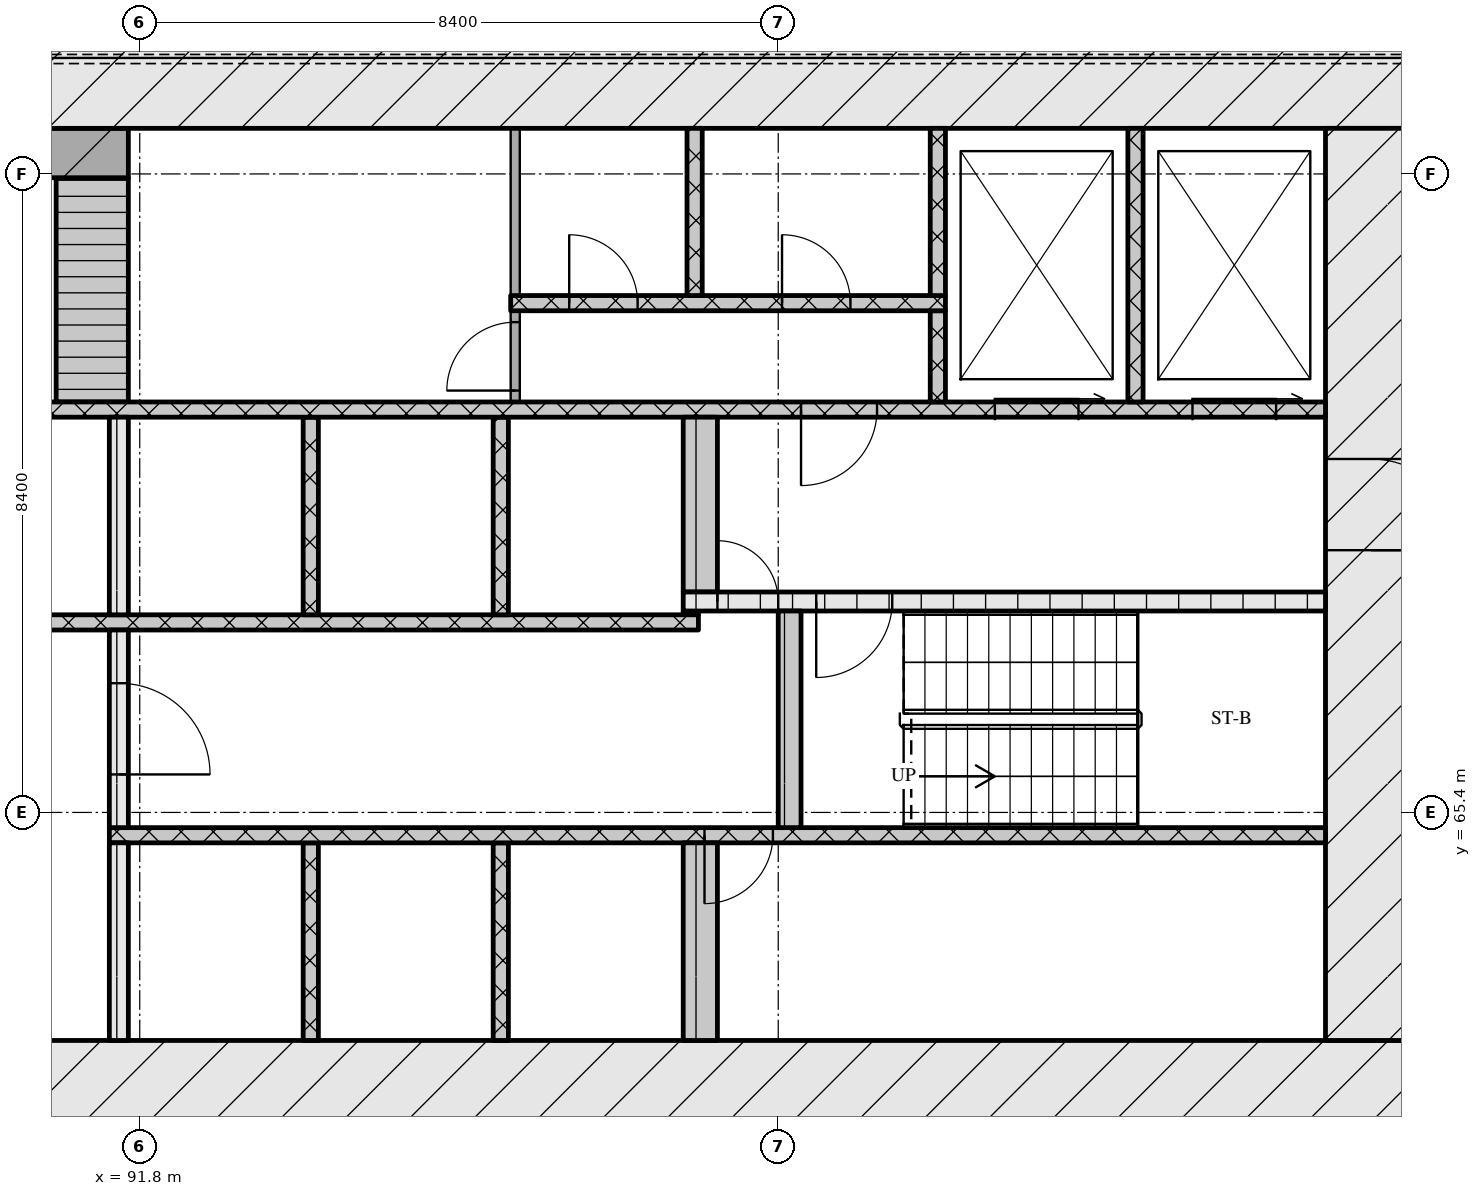
"""IFC4 building model, lengths in metres.
Left out: names, types, materials, properties, quantities, classifications, styles, units other than length and angle.
Written with IfcOpenShell. Run it as: python <this file> out.ifc"""

import sys

from ifc_helpers import new_model, si_unit, direction, frame, frame_2d, origin, place, context, subcontext, project, spatial, rectangle, extrude, element, fill, save


model = new_model("IFC4")
c1 = context("Model", 3, precision=1e-05, world=origin(), true_north=direction((0.0, 1.0)))
c2 = subcontext(c1, "Body", "Model", "MODEL_VIEW")
j1 = project(units=[si_unit("LENGTHUNIT", "METRE"), si_unit("PLANEANGLEUNIT", "RADIAN")], contexts=[c1])
p1 = place(None, origin())
s1 = spatial("IfcSite", under=j1, at=p1, CompositionType="ELEMENT")
p2 = place(p1, origin())
s2 = spatial("IfcBuilding", under=s1, at=p2, CompositionType="ELEMENT")
p3 = place(p2, frame((0.0, 0.0, 23.7)))
s3 = spatial("IfcBuildingStorey", under=s2, at=p3, CompositionType="ELEMENT", Elevation=23.7)
p4 = place(p3, frame((66.6, 61.8, 0.0), z_axis=(0.0, 0.0, 1.0), x_axis=(1.0, 0.0, 0.0)))
e1 = element("IfcWall", 1, at=p4, inside=s3, PredefinedType="SOLIDWALL", context=c2, shape_type="SweptSolid", body=[
    extrude(rectangle(XDim=42.0, YDim=1.2, at=frame_2d((21.0, 0.0))), origin(), (0.0, 0.0, 1.0), 4.2),
])
p5 = place(p4, frame((21.35, 0.0, 0.0)))
e2 = element("IfcOpeningElement", 2, at=p5, cuts=e1, PredefinedType="OPENING", context=c2, shape_type="SweptSolid", body=[
    extrude(rectangle(XDim=1.8, YDim=2.1, at=frame_2d((0.9, 1.05))), frame((0.0, 0.61, 0.0), z_axis=(0.0, -1.0, 0.0), x_axis=(1.0, 0.0, 0.0)), (0.0, 0.0, 1.0), 1.22),
])
p6 = place(p3, frame((66.6, 75.0, 0.0), z_axis=(0.0, 0.0, 1.0), x_axis=(1.0, 0.0, 0.0)))
e3 = element("IfcWall", 3, at=p6, inside=s3, PredefinedType="SOLIDWALL", context=c2, shape_type="SweptSolid", body=[
    extrude(rectangle(XDim=42.0, YDim=1.2, at=frame_2d((21.0, 0.0))), origin(), (0.0, 0.0, 1.0), 4.2),
])
p7 = place(p3, frame((108.0, 62.4, 0.0), z_axis=(0.0, 0.0, 1.0), x_axis=(0.0, 1.0, 0.0)))
e4 = element("IfcWall", 4, at=p7, inside=s3, PredefinedType="SOLIDWALL", context=c2, shape_type="SweptSolid", body=[
    extrude(rectangle(XDim=12.0, YDim=1.2, at=frame_2d((6.0, 0.0))), origin(), (0.0, 0.0, 1.0), 4.2),
])
p8 = place(p7, frame((6.45, 0.0, 0.0)))
e5 = element("IfcOpeningElement", 5, at=p8, cuts=e4, PredefinedType="OPENING", context=c2, shape_type="SweptSolid", body=[
    extrude(rectangle(XDim=1.2, YDim=2.1, at=frame_2d((0.6, 1.05))), frame((0.0, 0.61, 0.0), z_axis=(0.0, -1.0, 0.0), x_axis=(1.0, 0.0, 0.0)), (0.0, 0.0, 1.0), 1.22),
])
p9 = place(p3, frame((91.525, 62.4, 0.0), z_axis=(0.0, 0.0, 1.0), x_axis=(0.0, 1.0, 0.0)))
e6 = element("IfcWall", 6, at=p9, inside=s3, PredefinedType="SOLIDWALL", context=c2, shape_type="SweptSolid", body=[
    extrude(rectangle(XDim=2.6, YDim=0.25, at=frame_2d((1.3, 0.0))), origin(), (0.0, 0.0, 1.0), 4.2),
])
for number, where, z_axis, x_axis in (
    (7, (94.05, 62.4, 0.0), (0.0, 0.0, 1.0), (0.0, 1.0, 0.0)),
    (8, (96.55, 62.4, 0.0), (0.0, 0.0, 1.0), (0.0, 1.0, 0.0)),
):
    element("IfcWall", number, at=place(p3, frame(where, z_axis=z_axis, x_axis=x_axis)), inside=s3, PredefinedType="SOLIDWALL", context=c2, shape_type="SweptSolid", body=[
        extrude(rectangle(XDim=2.6, YDim=0.2, at=frame_2d((1.3, 0.0))), origin(), (0.0, 0.0, 1.0), 4.2),
    ])
p10 = place(p3, frame((99.175, 62.4, 0.0), z_axis=(0.0, 0.0, 1.0), x_axis=(0.0, 1.0, 0.0)))
e9 = element("IfcWall", 9, at=p10, inside=s3, PredefinedType="SOLIDWALL", context=c2, shape_type="SweptSolid", body=[
    extrude(rectangle(XDim=2.6, YDim=0.45, at=frame_2d((1.3, 0.0))), origin(), (0.0, 0.0, 1.0), 4.2),
])
p11 = place(p3, frame((91.4, 65.1, 0.0), z_axis=(0.0, 0.0, 1.0), x_axis=(1.0, 0.0, 0.0)))
e10 = element("IfcWall", 10, at=p11, inside=s3, PredefinedType="SOLIDWALL", context=c2, shape_type="SweptSolid", body=[
    extrude(rectangle(XDim=16.0, YDim=0.2, at=frame_2d((8.0, 0.0))), origin(), (0.0, 0.0, 1.0), 4.2),
])
p12 = place(p11, frame((7.83, 0.0, 0.0)))
e11 = element("IfcOpeningElement", 11, at=p12, cuts=e10, PredefinedType="OPENING", context=c2, shape_type="SweptSolid", body=[
    extrude(rectangle(XDim=0.9, YDim=2.1, at=frame_2d((0.45, 1.05))), frame((0.0, 0.11, 0.0), z_axis=(0.0, -1.0, 0.0), x_axis=(1.0, 0.0, 0.0)), (0.0, 0.0, 1.0), 0.22),
])
p13 = place(p3, frame((91.525, 65.2, 0.0), z_axis=(0.0, 0.0, 1.0), x_axis=(0.0, 1.0, 0.0)))
e12 = element("IfcWall", 12, at=p13, inside=s3, PredefinedType="SOLIDWALL", context=c2, shape_type="SweptSolid", body=[
    extrude(rectangle(XDim=2.6, YDim=0.25, at=frame_2d((1.3, 0.0))), origin(), (0.0, 0.0, 1.0), 4.2),
])
p14 = place(p13, frame((0.7, 0.0, 0.0)))
e13 = element("IfcOpeningElement", 13, at=p14, cuts=e12, PredefinedType="OPENING", context=c2, shape_type="SweptSolid", body=[
    extrude(rectangle(XDim=1.2, YDim=2.1, at=frame_2d((0.6, 1.05))), frame((0.0, 0.135, 0.0), z_axis=(0.0, -1.0, 0.0), x_axis=(1.0, 0.0, 0.0)), (0.0, 0.0, 1.0), 0.27),
])
p15 = place(p3, frame((100.35, 65.2, 0.0), z_axis=(0.0, 0.0, 1.0), x_axis=(0.0, 1.0, 0.0)))
e14 = element("IfcWall", 14, at=p15, inside=s3, PredefinedType="SOLIDWALL", context=c2, shape_type="SweptSolid", body=[
    extrude(rectangle(XDim=2.85, YDim=0.3, at=frame_2d((1.425, 0.0))), origin(), (0.0, 0.0, 1.0), 4.2),
])
p16 = place(p3, frame((76.05, 67.9, 0.0), z_axis=(0.0, 0.0, 1.0), x_axis=(1.0, 0.0, 0.0)))
e15 = element("IfcWall", 15, at=p16, inside=s3, PredefinedType="SOLIDWALL", context=c2, shape_type="SweptSolid", body=[
    extrude(rectangle(XDim=23.1, YDim=0.2, at=frame_2d((11.55, 0.0))), origin(), (0.0, 0.0, 1.0), 4.2),
])
p17 = place(p16, frame((8.35, 0.0, 0.0)))
e16 = element("IfcOpeningElement", 16, at=p17, cuts=e15, PredefinedType="OPENING", context=c2, shape_type="SweptSolid", body=[
    extrude(rectangle(XDim=1.1, YDim=2.1, at=frame_2d((0.55, 1.05))), frame((0.0, 0.11, 0.0), z_axis=(0.0, -1.0, 0.0), x_axis=(1.0, 0.0, 0.0)), (0.0, 0.0, 1.0), 0.22),
])
p18 = place(p16, frame((10.85, 0.0, 0.0)))
e17 = element("IfcOpeningElement", 17, at=p18, cuts=e15, PredefinedType="OPENING", context=c2, shape_type="SweptSolid", body=[
    extrude(rectangle(XDim=1.1, YDim=2.1, at=frame_2d((0.55, 1.05))), frame((0.0, 0.11, 0.0), z_axis=(0.0, -1.0, 0.0), x_axis=(1.0, 0.0, 0.0)), (0.0, 0.0, 1.0), 0.22),
])
p19 = place(p16, frame((13.55, 0.0, 0.0)))
e18 = element("IfcOpeningElement", 18, at=p19, cuts=e15, PredefinedType="OPENING", context=c2, shape_type="SweptSolid", body=[
    extrude(rectangle(XDim=1.0, YDim=2.1, at=frame_2d((0.5, 1.05))), frame((0.0, 0.11, 0.0), z_axis=(0.0, -1.0, 0.0), x_axis=(1.0, 0.0, 0.0)), (0.0, 0.0, 1.0), 0.22),
])
p20 = place(p3, frame((91.525, 68.0, 0.0), z_axis=(0.0, 0.0, 1.0), x_axis=(0.0, 1.0, 0.0)))
e19 = element("IfcWall", 19, at=p20, inside=s3, PredefinedType="SOLIDWALL", context=c2, shape_type="SweptSolid", body=[
    extrude(rectangle(XDim=2.6, YDim=0.25, at=frame_2d((1.3, 0.0))), origin(), (0.0, 0.0, 1.0), 4.2),
])
for number, where, z_axis, x_axis in (
    (20, (94.05, 68.0, 0.0), (0.0, 0.0, 1.0), (0.0, 1.0, 0.0)),
    (21, (96.55, 68.0, 0.0), (0.0, 0.0, 1.0), (0.0, 1.0, 0.0)),
):
    element("IfcWall", number, at=place(p3, frame(where, z_axis=z_axis, x_axis=x_axis)), inside=s3, PredefinedType="SOLIDWALL", context=c2, shape_type="SweptSolid", body=[
        extrude(rectangle(XDim=2.6, YDim=0.2, at=frame_2d((1.3, 0.0))), origin(), (0.0, 0.0, 1.0), 4.2),
    ])
p21 = place(p3, frame((98.95, 68.025, 0.0), z_axis=(0.0, 0.0, 1.0), x_axis=(1.0, 0.0, 0.0)))
e22 = element("IfcWall", 22, at=p21, inside=s3, PredefinedType="SOLIDWALL", context=c2, shape_type="SweptSolid", body=[
    extrude(rectangle(XDim=0.2, YDim=0.05, at=frame_2d((0.1, 0.0))), origin(), (0.0, 0.0, 1.0), 4.2),
])
p22 = place(p3, frame((98.95, 68.175, 0.0), z_axis=(0.0, 0.0, 1.0), x_axis=(1.0, 0.0, 0.0)))
e23 = element("IfcWall", 23, at=p22, inside=s3, PredefinedType="SOLIDWALL", context=c2, shape_type="SweptSolid", body=[
    extrude(rectangle(XDim=8.45, YDim=0.25, at=frame_2d((4.225, 0.0))), origin(), (0.0, 0.0, 1.0), 4.2),
])
p23 = place(p22, frame((0.45, 0.0, 0.0)))
e24 = element("IfcOpeningElement", 24, at=p23, cuts=e23, PredefinedType="OPENING", context=c2, shape_type="SweptSolid", body=[
    extrude(rectangle(XDim=0.8, YDim=2.1, at=frame_2d((0.4, 1.05))), frame((0.0, 0.135, 0.0), z_axis=(0.0, -1.0, 0.0), x_axis=(1.0, 0.0, 0.0)), (0.0, 0.0, 1.0), 0.27),
])
p24 = place(p22, frame((1.75, 0.0, 0.0)))
e25 = element("IfcOpeningElement", 25, at=p24, cuts=e23, PredefinedType="OPENING", context=c2, shape_type="SweptSolid", body=[
    extrude(rectangle(XDim=1.0, YDim=2.1, at=frame_2d((0.5, 1.05))), frame((0.0, 0.135, 0.0), z_axis=(0.0, -1.0, 0.0), x_axis=(1.0, 0.0, 0.0)), (0.0, 0.0, 1.0), 0.27),
])
p25 = place(p3, frame((99.175, 68.3, 0.0), z_axis=(0.0, 0.0, 1.0), x_axis=(0.0, 1.0, 0.0)))
e26 = element("IfcWall", 26, at=p25, inside=s3, PredefinedType="SOLIDWALL", context=c2, shape_type="SweptSolid", body=[
    extrude(rectangle(XDim=2.3, YDim=0.45, at=frame_2d((1.15, 0.0))), origin(), (0.0, 0.0, 1.0), 4.2),
])
p26 = place(p3, frame((67.8, 70.7, 0.0), z_axis=(0.0, 0.0, 1.0), x_axis=(1.0, 0.0, 0.0)))
e27 = element("IfcWall", 27, at=p26, inside=s3, PredefinedType="SOLIDWALL", context=c2, shape_type="SweptSolid", body=[
    extrude(rectangle(XDim=39.6, YDim=0.2, at=frame_2d((19.8, 0.0))), origin(), (0.0, 0.0, 1.0), 4.2),
])
p27 = place(p26, frame((0.65, 0.0, 0.0)))
e28 = element("IfcOpeningElement", 28, at=p27, cuts=e27, PredefinedType="OPENING", context=c2, shape_type="SweptSolid", body=[
    extrude(rectangle(XDim=1.1, YDim=2.1, at=frame_2d((0.55, 1.05))), frame((0.0, 0.11, 0.0), z_axis=(0.0, -1.0, 0.0), x_axis=(1.0, 0.0, 0.0)), (0.0, 0.0, 1.0), 0.22),
])
p28 = place(p26, frame((3.25, 0.0, 0.0)))
e29 = element("IfcOpeningElement", 29, at=p28, cuts=e27, PredefinedType="OPENING", context=c2, shape_type="SweptSolid", body=[
    extrude(rectangle(XDim=1.1, YDim=2.1, at=frame_2d((0.55, 1.05))), frame((0.0, 0.11, 0.0), z_axis=(0.0, -1.0, 0.0), x_axis=(1.0, 0.0, 0.0)), (0.0, 0.0, 1.0), 0.22),
])
p29 = place(p26, frame((5.9, 0.0, 0.0)))
e30 = element("IfcOpeningElement", 30, at=p29, cuts=e27, PredefinedType="OPENING", context=c2, shape_type="SweptSolid", body=[
    extrude(rectangle(XDim=1.0, YDim=2.1, at=frame_2d((0.5, 1.05))), frame((0.0, 0.11, 0.0), z_axis=(0.0, -1.0, 0.0), x_axis=(1.0, 0.0, 0.0)), (0.0, 0.0, 1.0), 0.22),
])
p30 = place(p26, frame((21.7, 0.0, 0.0)))
e31 = element("IfcOpeningElement", 31, at=p30, cuts=e27, PredefinedType="OPENING", context=c2, shape_type="SweptSolid", body=[
    extrude(rectangle(XDim=1.0, YDim=2.1, at=frame_2d((0.5, 1.05))), frame((0.0, 0.11, 0.0), z_axis=(0.0, -1.0, 0.0), x_axis=(1.0, 0.0, 0.0)), (0.0, 0.0, 1.0), 0.22),
])
p31 = place(p26, frame((32.7, 0.0, 0.0)))
e32 = element("IfcOpeningElement", 32, at=p31, cuts=e27, PredefinedType="OPENING", context=c2, shape_type="SweptSolid", body=[
    extrude(rectangle(XDim=1.0, YDim=2.1, at=frame_2d((0.5, 1.05))), frame((0.0, 0.11, 0.0), z_axis=(0.0, -1.0, 0.0), x_axis=(1.0, 0.0, 0.0)), (0.0, 0.0, 1.0), 0.22),
])
p32 = place(p26, frame((35.25, 0.0, 0.0)))
e33 = element("IfcOpeningElement", 33, at=p32, cuts=e27, PredefinedType="OPENING", context=c2, shape_type="SweptSolid", body=[
    extrude(rectangle(XDim=1.1, YDim=2.1, at=frame_2d((0.55, 1.05))), frame((0.0, 0.11, 0.0), z_axis=(0.0, -1.0, 0.0), x_axis=(1.0, 0.0, 0.0)), (0.0, 0.0, 1.0), 0.22),
])
p33 = place(p26, frame((37.85, 0.0, 0.0)))
e34 = element("IfcOpeningElement", 34, at=p33, cuts=e27, PredefinedType="OPENING", context=c2, shape_type="SweptSolid", body=[
    extrude(rectangle(XDim=1.1, YDim=2.1, at=frame_2d((0.55, 1.05))), frame((0.0, 0.11, 0.0), z_axis=(0.0, -1.0, 0.0), x_axis=(1.0, 0.0, 0.0)), (0.0, 0.0, 1.0), 0.22),
])
p34 = place(p3, frame((91.175, 70.8, 0.0), z_axis=(0.0, 0.0, 1.0), x_axis=(0.0, 1.0, 0.0)))
e35 = element("IfcWall", 35, at=p34, inside=s3, PredefinedType="SOLIDWALL", context=c2, shape_type="SweptSolid", body=[
    extrude(rectangle(XDim=2.95, YDim=0.95, at=frame_2d((1.475, 0.0))), origin(), (0.0, 0.0, 1.0), 4.2),
])
p35 = place(p3, frame((96.74, 70.8, 0.0), z_axis=(0.0, 0.0, 1.0), x_axis=(0.0, 1.0, 0.0)))
e36 = element("IfcWall", 36, at=p35, inside=s3, PredefinedType="PARTITIONING", context=c2, shape_type="SweptSolid", body=[
    extrude(rectangle(XDim=1.2, YDim=0.12, at=frame_2d((0.6, 0.0))), origin(), (0.0, 0.0, 1.0), 4.2),
])
p36 = place(p35, frame((0.15, 0.0, 0.0)))
e37 = element("IfcOpeningElement", 37, at=p36, cuts=e36, PredefinedType="OPENING", context=c2, shape_type="SweptSolid", body=[
    extrude(rectangle(XDim=0.9, YDim=2.1, at=frame_2d((0.45, 1.05))), frame((0.0, 0.07, 0.0), z_axis=(0.0, -1.0, 0.0), x_axis=(1.0, 0.0, 0.0)), (0.0, 0.0, 1.0), 0.14),
])
p37 = place(p3, frame((102.3, 70.8, 0.0), z_axis=(0.0, 0.0, 1.0), x_axis=(0.0, 1.0, 0.0)))
e38 = element("IfcWall", 38, at=p37, inside=s3, PredefinedType="SOLIDWALL", context=c2, shape_type="SweptSolid", body=[
    extrude(rectangle(XDim=1.2, YDim=0.2, at=frame_2d((0.6, 0.0))), origin(), (0.0, 0.0, 1.0), 4.2),
])
p38 = place(p3, frame((104.9, 70.8, 0.0), z_axis=(0.0, 0.0, 1.0), x_axis=(0.0, 1.0, 0.0)))
e39 = element("IfcWall", 39, at=p38, inside=s3, PredefinedType="SOLIDWALL", context=c2, shape_type="SweptSolid", body=[
    extrude(rectangle(XDim=3.6, YDim=0.2, at=frame_2d((1.8, 0.0))), origin(), (0.0, 0.0, 1.0), 4.2),
])
p39 = place(p3, frame((96.68, 72.1, 0.0), z_axis=(0.0, 0.0, 1.0), x_axis=(1.0, 0.0, 0.0)))
e40 = element("IfcWall", 40, at=p39, inside=s3, PredefinedType="SOLIDWALL", context=c2, shape_type="SweptSolid", body=[
    extrude(rectangle(XDim=5.72, YDim=0.2, at=frame_2d((2.86, 0.0))), origin(), (0.0, 0.0, 1.0), 4.2),
])
p40 = place(p39, frame((0.77, 0.0, 0.0)))
e41 = element("IfcOpeningElement", 41, at=p40, cuts=e40, PredefinedType="OPENING", context=c2, shape_type="SweptSolid", body=[
    extrude(rectangle(XDim=0.9, YDim=2.1, at=frame_2d((0.45, 1.05))), frame((0.0, 0.11, 0.0), z_axis=(0.0, -1.0, 0.0), x_axis=(1.0, 0.0, 0.0)), (0.0, 0.0, 1.0), 0.22),
])
p41 = place(p39, frame((3.57, 0.0, 0.0)))
e42 = element("IfcOpeningElement", 42, at=p41, cuts=e40, PredefinedType="OPENING", context=c2, shape_type="SweptSolid", body=[
    extrude(rectangle(XDim=0.9, YDim=2.1, at=frame_2d((0.45, 1.05))), frame((0.0, 0.11, 0.0), z_axis=(0.0, -1.0, 0.0), x_axis=(1.0, 0.0, 0.0)), (0.0, 0.0, 1.0), 0.22),
])
p42 = place(p3, frame((96.74, 72.2, 0.0), z_axis=(0.0, 0.0, 1.0), x_axis=(0.0, 1.0, 0.0)))
e43 = element("IfcWall", 43, at=p42, inside=s3, PredefinedType="PARTITIONING", context=c2, shape_type="SweptSolid", body=[
    extrude(rectangle(XDim=2.2, YDim=0.12, at=frame_2d((1.1, 0.0))), origin(), (0.0, 0.0, 1.0), 4.2),
])
for number, where, z_axis, x_axis in (
    (44, (99.1, 72.2, 0.0), (0.0, 0.0, 1.0), (0.0, 1.0, 0.0)),
    (45, (102.3, 72.2, 0.0), (0.0, 0.0, 1.0), (0.0, 1.0, 0.0)),
):
    element("IfcWall", number, at=place(p3, frame(where, z_axis=z_axis, x_axis=x_axis)), inside=s3, PredefinedType="SOLIDWALL", context=c2, shape_type="SweptSolid", body=[
        extrude(rectangle(XDim=2.2, YDim=0.2, at=frame_2d((1.1, 0.0))), origin(), (0.0, 0.0, 1.0), 4.2),
    ])
p43 = place(p3, frame((83.55, 74.075, 0.0), z_axis=(0.0, 0.0, 1.0), x_axis=(1.0, 0.0, 0.0)))
e46 = element("IfcWall", 46, at=p43, inside=s3, PredefinedType="SOLIDWALL", context=c2, shape_type="SweptSolid", body=[
    extrude(rectangle(XDim=8.1, YDim=0.65, at=frame_2d((4.05, 0.0))), origin(), (0.0, 0.0, 1.0), 4.2),
])
p44 = place(p12, origin())
e47 = element("IfcDoor", 47, at=p44, inside=s3, OperationType="SINGLE_SWING_RIGHT", PredefinedType="DOOR", context=c2, shape_type="SweptSolid", body=[
    extrude(rectangle(XDim=0.9, YDim=2.1, at=frame_2d((0.45, 1.05))), frame((0.0, 0.025, 0.0), z_axis=(0.0, -1.0, 0.0), x_axis=(1.0, 0.0, 0.0)), (0.0, 0.0, 1.0), 0.05),
])
fill(e11, e47)
p45 = place(p14, origin())
e48 = element("IfcDoor", 48, at=p45, inside=s3, OperationType="SINGLE_SWING_RIGHT", PredefinedType="DOOR", context=c2, shape_type="SweptSolid", body=[
    extrude(rectangle(XDim=1.2, YDim=2.1, at=frame_2d((0.6, 1.05))), frame((0.0, 0.025, 0.0), z_axis=(0.0, -1.0, 0.0), x_axis=(1.0, 0.0, 0.0)), (0.0, 0.0, 1.0), 0.05),
])
fill(e13, e48)
p46 = place(p23, origin())
e49 = element("IfcDoor", 49, at=p46, inside=s3, OperationType="SINGLE_SWING_LEFT", PredefinedType="DOOR", context=c2, shape_type="SweptSolid", body=[
    extrude(rectangle(XDim=0.8, YDim=2.1, at=frame_2d((0.4, 1.05))), frame((0.0, 0.025, 0.0), z_axis=(0.0, -1.0, 0.0), x_axis=(1.0, 0.0, 0.0)), (0.0, 0.0, 1.0), 0.05),
])
fill(e24, e49)
p47 = place(p24, origin())
e50 = element("IfcDoor", 50, at=p47, inside=s3, OperationType="SINGLE_SWING_RIGHT", PredefinedType="DOOR", context=c2, shape_type="SweptSolid", body=[
    extrude(rectangle(XDim=1.0, YDim=2.1, at=frame_2d((0.5, 1.05))), frame((0.0, 0.025, 0.0), z_axis=(0.0, -1.0, 0.0), x_axis=(1.0, 0.0, 0.0)), (0.0, 0.0, 1.0), 0.05),
])
fill(e25, e50)
p48 = place(p8, origin())
e51 = element("IfcDoor", 51, at=p48, inside=s3, OperationType="SINGLE_SWING_RIGHT", PredefinedType="DOOR", context=c2, shape_type="SweptSolid", body=[
    extrude(rectangle(XDim=1.2, YDim=2.1, at=frame_2d((0.6, 1.05))), frame((0.0, 0.025, 0.0), z_axis=(0.0, -1.0, 0.0), x_axis=(1.0, 0.0, 0.0)), (0.0, 0.0, 1.0), 0.05),
])
fill(e5, e51)
p49 = place(p31, origin())
e52 = element("IfcDoor", 52, at=p49, inside=s3, OperationType="SINGLE_SWING_RIGHT", PredefinedType="DOOR", context=c2, shape_type="SweptSolid", body=[
    extrude(rectangle(XDim=1.0, YDim=2.1, at=frame_2d((0.5, 1.05))), frame((0.0, 0.025, 0.0), z_axis=(0.0, -1.0, 0.0), x_axis=(1.0, 0.0, 0.0)), (0.0, 0.0, 1.0), 0.05),
])
fill(e32, e52)
p50 = place(p32, origin())
e53 = element("IfcDoor", 53, at=p50, inside=s3, OperationType="SLIDING_TO_RIGHT", PredefinedType="DOOR", context=c2, shape_type="SweptSolid", body=[
    extrude(rectangle(XDim=1.1, YDim=2.1, at=frame_2d((0.55, 1.05))), frame((0.0, 0.025, 0.0), z_axis=(0.0, -1.0, 0.0), x_axis=(1.0, 0.0, 0.0)), (0.0, 0.0, 1.0), 0.05),
])
fill(e33, e53)
p51 = place(p33, origin())
e54 = element("IfcDoor", 54, at=p51, inside=s3, OperationType="SLIDING_TO_RIGHT", PredefinedType="DOOR", context=c2, shape_type="SweptSolid", body=[
    extrude(rectangle(XDim=1.1, YDim=2.1, at=frame_2d((0.55, 1.05))), frame((0.0, 0.025, 0.0), z_axis=(0.0, -1.0, 0.0), x_axis=(1.0, 0.0, 0.0)), (0.0, 0.0, 1.0), 0.05),
])
fill(e34, e54)
p52 = place(p36, origin())
e55 = element("IfcDoor", 55, at=p52, inside=s3, OperationType="SINGLE_SWING_LEFT", PredefinedType="DOOR", context=c2, shape_type="SweptSolid", body=[
    extrude(rectangle(XDim=0.9, YDim=2.1, at=frame_2d((0.45, 1.05))), frame((0.0, 0.025, 0.0), z_axis=(0.0, -1.0, 0.0), x_axis=(1.0, 0.0, 0.0)), (0.0, 0.0, 1.0), 0.05),
])
fill(e37, e55)
p53 = place(p40, origin())
e56 = element("IfcDoor", 56, at=p53, inside=s3, OperationType="SINGLE_SWING_LEFT", PredefinedType="DOOR", context=c2, shape_type="SweptSolid", body=[
    extrude(rectangle(XDim=0.9, YDim=2.1, at=frame_2d((0.45, 1.05))), frame((0.0, 0.025, 0.0), z_axis=(0.0, -1.0, 0.0), x_axis=(1.0, 0.0, 0.0)), (0.0, 0.0, 1.0), 0.05),
])
fill(e41, e56)
p54 = place(p41, origin())
e57 = element("IfcDoor", 57, at=p54, inside=s3, OperationType="SINGLE_SWING_LEFT", PredefinedType="DOOR", context=c2, shape_type="SweptSolid", body=[
    extrude(rectangle(XDim=0.9, YDim=2.1, at=frame_2d((0.45, 1.05))), frame((0.0, 0.025, 0.0), z_axis=(0.0, -1.0, 0.0), x_axis=(1.0, 0.0, 0.0)), (0.0, 0.0, 1.0), 0.05),
])
fill(e42, e57)
save(model, sys.argv[1])
